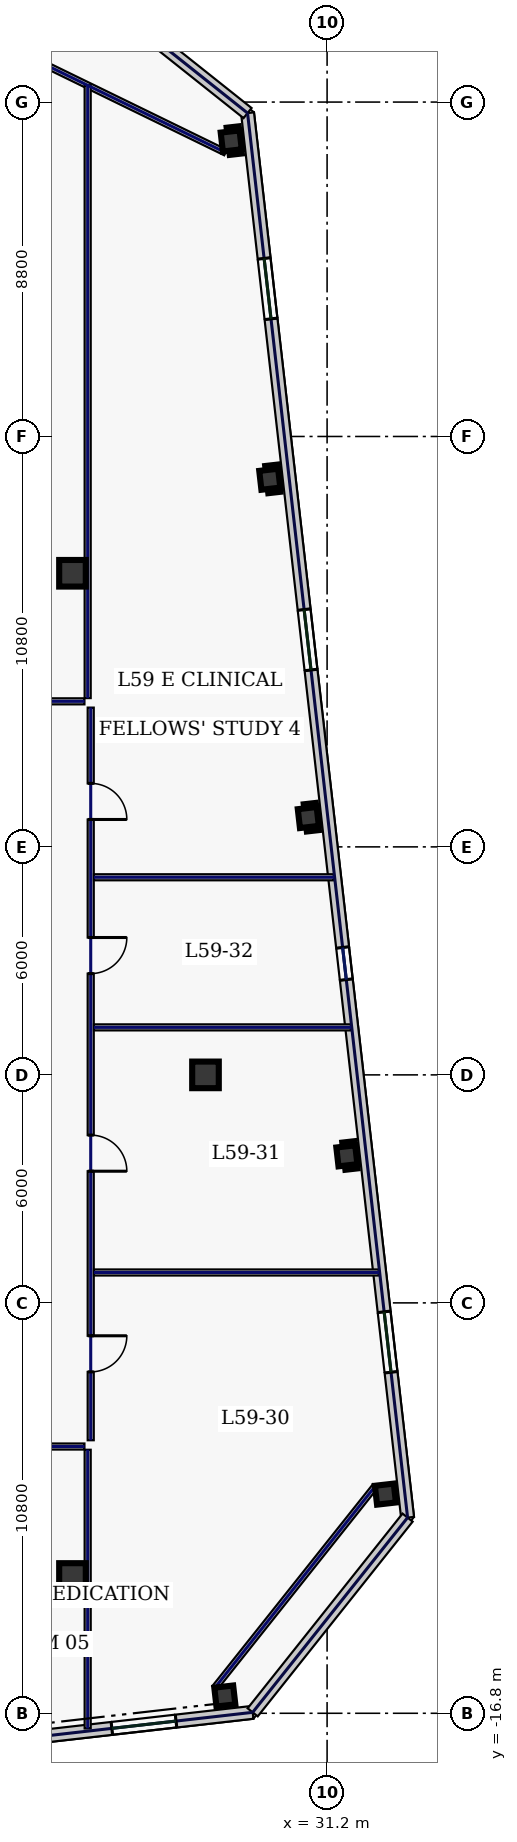
"""IFC4 building model, lengths in metres.
Left out: names, types, materials, properties, quantities, classifications, styles, units other than length and angle.
Written with IfcOpenShell. Run it as: python <this file> out.ifc"""

import sys

from ifc_helpers import new_model, si_unit, direction, frame, frame_2d, origin, origin_2d, place, context, subcontext, project, spatial, rectangle, hollow_rectangle, extrude, element, fill, save


model = new_model("IFC4")
c1 = context("Model", 3, precision=1e-05, world=origin(), true_north=direction((0.0, 1.0)))
c2 = subcontext(c1, "Body", "Model", "MODEL_VIEW")
j1 = project(units=[si_unit("LENGTHUNIT", "METRE"), si_unit("PLANEANGLEUNIT", "RADIAN")], contexts=[c1])
p1 = place(None, origin())
s1 = spatial("IfcSite", under=j1, at=p1, CompositionType="ELEMENT")
p2 = place(p1, origin())
s2 = spatial("IfcBuilding", under=s1, at=p2, CompositionType="ELEMENT")
p3 = place(p2, frame((0.0, 0.0, 255.0)))
s3 = spatial("IfcBuildingStorey", under=s2, at=p3, CompositionType="ELEMENT", Elevation=255.0)
for number, where, z_axis, x_axis in (
    (1, (24.5, -13.2, 0.0), (0.0, 0.0, 1.0), (1.0, 0.0, 0.0)),
    (2, (24.5, 13.2, 0.0), (0.0, 0.0, 1.0), (1.0, 0.0, 0.0)),
    (3, (28.0, 0.0, 0.0), (0.0, 0.0, 1.0), (1.0, 0.0, 0.0)),
):
    element("IfcColumn", number, at=place(p3, frame(where, z_axis=z_axis, x_axis=x_axis)), inside=s3, PredefinedType="COLUMN", context=c2, shape_type="SweptSolid", body=[
        extrude(hollow_rectangle(XDim=0.7, YDim=0.7, WallThickness=0.032, at=origin_2d()), origin(), (0.0, 0.0, 1.0), 3.74),
    ])
for number, where, z_axis, x_axis in (
    (4, (28.509, -16.345, 0.0), (0.0, 0.0, 1.0), (0.994, 0.113, 0.0)),
    (5, (32.734, -11.033, 0.0), (0.0, 0.0, 1.0), (0.994, 0.113, 0.0)),
    (6, (31.72, -2.131, 0.0), (0.0, 0.0, 1.0), (0.994, 0.113, 0.0)),
    (7, (30.706, 6.772, 0.0), (0.0, 0.0, 1.0), (0.994, 0.113, 0.0)),
    (8, (29.691, 15.674, 0.0), (0.0, 0.0, 1.0), (0.994, 0.113, 0.0)),
    (9, (28.677, 24.577, 0.0), (0.0, 0.0, 1.0), (0.994, 0.113, 0.0)),
):
    element("IfcColumn", number, at=place(p3, frame(where, z_axis=z_axis, x_axis=x_axis)), inside=s3, PredefinedType="COLUMN", context=c2, shape_type="SweptSolid", body=[
        extrude(hollow_rectangle(XDim=0.5, YDim=0.5, WallThickness=0.025, at=origin_2d()), origin(), (0.0, 0.0, 1.0), 3.74),
    ])
p4 = place(p3, frame((10.71, -18.886, 0.0), z_axis=(0.0, 0.0, 1.0), x_axis=(0.993572271362, 0.113199565282, 0.0)))
e10 = element("IfcWall", 10, at=p4, inside=s3, PredefinedType="STANDARD", context=c2, shape_type="SweptSolid", body=[
    extrude(rectangle(XDim=18.651, YDim=0.34, at=frame_2d((9.326, 0.0))), origin(), (0.0, 0.0, 1.0), 3.74),
])
p5 = place(p4, frame((3.024, 0.0, 0.88)))
e11 = element("IfcOpeningElement", 11, at=p5, cuts=e10, PredefinedType="OPENING", context=c2, shape_type="SweptSolid", body=[
    extrude(rectangle(XDim=1.7, YDim=1.95, at=frame_2d((0.85, 0.975))), frame((0.0, 0.18, 0.0), z_axis=(0.0, -1.0, 0.0), x_axis=(1.0, 0.0, 0.0)), (0.0, 0.0, 1.0), 0.36),
])
p6 = place(p4, frame((6.773, 0.0, 0.88)))
e12 = element("IfcOpeningElement", 12, at=p6, cuts=e10, PredefinedType="OPENING", context=c2, shape_type="SweptSolid", body=[
    extrude(rectangle(XDim=1.7, YDim=1.95, at=frame_2d((0.85, 0.975))), frame((0.0, 0.18, 0.0), z_axis=(0.0, -1.0, 0.0), x_axis=(1.0, 0.0, 0.0)), (0.0, 0.0, 1.0), 0.36),
])
p7 = place(p4, frame((11.173, 0.0, 0.88)))
e13 = element("IfcOpeningElement", 13, at=p7, cuts=e10, PredefinedType="OPENING", context=c2, shape_type="SweptSolid", body=[
    extrude(rectangle(XDim=1.7, YDim=1.95, at=frame_2d((0.85, 0.975))), frame((0.0, 0.18, 0.0), z_axis=(0.0, -1.0, 0.0), x_axis=(1.0, 0.0, 0.0)), (0.0, 0.0, 1.0), 0.36),
])
p8 = place(p4, frame((14.921, 0.0, 0.88)))
e14 = element("IfcOpeningElement", 14, at=p8, cuts=e10, PredefinedType="OPENING", context=c2, shape_type="SweptSolid", body=[
    extrude(rectangle(XDim=1.7, YDim=1.95, at=frame_2d((0.85, 0.975))), frame((0.0, 0.18, 0.0), z_axis=(0.0, -1.0, 0.0), x_axis=(1.0, 0.0, 0.0)), (0.0, 0.0, 1.0), 0.36),
])
p9 = place(p3, frame((33.318, -11.651, 0.0), z_axis=(0.0, 0.0, 1.0), x_axis=(-0.11320360501, 0.9935718111, 0.0)))
e15 = element("IfcWall", 15, at=p9, inside=s3, PredefinedType="STANDARD", context=c2, shape_type="SweptSolid", body=[
    extrude(rectangle(XDim=37.2, YDim=0.34, at=frame_2d((18.6, 0.0))), origin(), (0.0, 0.0, 1.0), 3.74),
])
p10 = place(p9, frame((3.85, 0.0, 0.58)))
e16 = element("IfcOpeningElement", 16, at=p10, cuts=e15, PredefinedType="OPENING", context=c2, shape_type="SweptSolid", body=[
    extrude(rectangle(XDim=1.6, YDim=2.3, at=frame_2d((0.8, 1.15))), frame((0.0, 0.18, 0.0), z_axis=(0.0, -1.0, 0.0), x_axis=(1.0, 0.0, 0.0)), (0.0, 0.0, 1.0), 0.36),
])
p11 = place(p9, frame((14.25, 0.0, 0.75)))
e17 = element("IfcOpeningElement", 17, at=p11, cuts=e15, PredefinedType="OPENING", context=c2, shape_type="SweptSolid", body=[
    extrude(rectangle(XDim=0.85, YDim=1.85, at=frame_2d((0.425, 0.925))), frame((0.0, 0.18, 0.0), z_axis=(0.0, -1.0, 0.0), x_axis=(1.0, 0.0, 0.0)), (0.0, 0.0, 1.0), 0.36),
])
p12 = place(p9, frame((22.45, 0.0, 0.58)))
e18 = element("IfcOpeningElement", 18, at=p12, cuts=e15, PredefinedType="OPENING", context=c2, shape_type="SweptSolid", body=[
    extrude(rectangle(XDim=1.6, YDim=2.3, at=frame_2d((0.8, 1.15))), frame((0.0, 0.18, 0.0), z_axis=(0.0, -1.0, 0.0), x_axis=(1.0, 0.0, 0.0)), (0.0, 0.0, 1.0), 0.36),
])
p13 = place(p9, frame((31.75, 0.0, 0.58)))
e19 = element("IfcOpeningElement", 19, at=p13, cuts=e15, PredefinedType="OPENING", context=c2, shape_type="SweptSolid", body=[
    extrude(rectangle(XDim=1.6, YDim=2.3, at=frame_2d((0.8, 1.15))), frame((0.0, 0.18, 0.0), z_axis=(0.0, -1.0, 0.0), x_axis=(1.0, 0.0, 0.0)), (0.0, 0.0, 1.0), 0.36),
])
for number, where, z_axis, x_axis in (
    (20, (29.242, -16.775, 0.0), (0.0, 0.0, 1.0), (0.623, 0.783, 0.0)),
    (21, (29.107, 25.31, 0.0), (0.0, 0.0, 1.0), (-0.783, 0.623, 0.0)),
):
    element("IfcWall", number, at=place(p3, frame(where, z_axis=z_axis, x_axis=x_axis)), inside=s3, PredefinedType="STANDARD", context=c2, shape_type="SweptSolid", body=[
        extrude(rectangle(XDim=6.548, YDim=0.34, at=frame_2d((3.274, 0.0))), origin(), (0.0, 0.0, 1.0), 3.74),
    ])
p14 = place(p3, frame((28.242, -16.134, 0.0), z_axis=(0.0, 0.0, 1.0), x_axis=(0.622521563328, 0.782602647064, 0.0)))
e22 = element("IfcWall", 22, at=p14, inside=s3, PredefinedType="PARTITIONING", context=c2, shape_type="SweptSolid", body=[
    extrude(rectangle(XDim=6.788, YDim=0.16, at=frame_2d((3.394, 0.0))), origin(), (0.0, 0.0, 1.0), 3.74),
])
p15 = place(p3, frame((28.528, 24.271, 0.0), z_axis=(0.0, 0.0, 1.0), x_axis=(-0.898820692789, 0.438316509173, 0.0)))
e23 = element("IfcWall", 23, at=p15, inside=s3, PredefinedType="PARTITIONING", context=c2, shape_type="SweptSolid", body=[
    extrude(rectangle(XDim=6.107, YDim=0.16, at=frame_2d((3.053, 0.0))), origin(), (0.0, 0.0, 1.0), 3.74),
])
p16 = place(p3, frame((-24.815, 9.83, 0.0), z_axis=(0.0, 0.0, 1.0), x_axis=(1.0, 0.0, 0.0)))
e24 = element("IfcWall", 24, at=p16, inside=s3, PredefinedType="PARTITIONING", context=c2, shape_type="SweptSolid", body=[
    extrude(rectangle(XDim=49.63, YDim=0.16, at=frame_2d((24.815, 0.0))), origin(), (0.0, 0.0, 1.0), 3.74),
])
p17 = place(p16, frame((1.869, 0.0, 0.0)))
e25 = element("IfcOpeningElement", 25, at=p17, cuts=e24, PredefinedType="OPENING", context=c2, shape_type="SweptSolid", body=[
    extrude(rectangle(XDim=1.3, YDim=2.2, at=frame_2d((0.65, 1.1))), frame((0.0, 0.09, 0.0), z_axis=(0.0, -1.0, 0.0), x_axis=(1.0, 0.0, 0.0)), (0.0, 0.0, 1.0), 0.18),
])
p18 = place(p16, frame((7.613, 0.0, 0.0)))
e26 = element("IfcOpeningElement", 26, at=p18, cuts=e24, PredefinedType="OPENING", context=c2, shape_type="SweptSolid", body=[
    extrude(rectangle(XDim=0.95, YDim=2.2, at=frame_2d((0.475, 1.1))), frame((0.0, 0.09, 0.0), z_axis=(0.0, -1.0, 0.0), x_axis=(1.0, 0.0, 0.0)), (0.0, 0.0, 1.0), 0.18),
])
p19 = place(p16, frame((14.038, 0.0, 0.0)))
e27 = element("IfcOpeningElement", 27, at=p19, cuts=e24, PredefinedType="OPENING", context=c2, shape_type="SweptSolid", body=[
    extrude(rectangle(XDim=0.95, YDim=2.2, at=frame_2d((0.475, 1.1))), frame((0.0, 0.09, 0.0), z_axis=(0.0, -1.0, 0.0), x_axis=(1.0, 0.0, 0.0)), (0.0, 0.0, 1.0), 0.18),
])
p20 = place(p16, frame((21.125, 0.0, 0.0)))
e28 = element("IfcOpeningElement", 28, at=p20, cuts=e24, PredefinedType="OPENING", context=c2, shape_type="SweptSolid", body=[
    extrude(rectangle(XDim=1.3, YDim=2.2, at=frame_2d((0.65, 1.1))), frame((0.0, 0.09, 0.0), z_axis=(0.0, -1.0, 0.0), x_axis=(1.0, 0.0, 0.0)), (0.0, 0.0, 1.0), 0.18),
])
p21 = place(p16, frame((29.225, 0.0, 0.0)))
e29 = element("IfcOpeningElement", 29, at=p21, cuts=e24, PredefinedType="OPENING", context=c2, shape_type="SweptSolid", body=[
    extrude(rectangle(XDim=1.3, YDim=2.2, at=frame_2d((0.65, 1.1))), frame((0.0, 0.09, 0.0), z_axis=(0.0, -1.0, 0.0), x_axis=(1.0, 0.0, 0.0)), (0.0, 0.0, 1.0), 0.18),
])
p22 = place(p16, frame((36.312, 0.0, 0.0)))
e30 = element("IfcOpeningElement", 30, at=p22, cuts=e24, PredefinedType="OPENING", context=c2, shape_type="SweptSolid", body=[
    extrude(rectangle(XDim=0.95, YDim=2.2, at=frame_2d((0.475, 1.1))), frame((0.0, 0.09, 0.0), z_axis=(0.0, -1.0, 0.0), x_axis=(1.0, 0.0, 0.0)), (0.0, 0.0, 1.0), 0.18),
])
p23 = place(p16, frame((41.863, 0.0, 0.0)))
e31 = element("IfcOpeningElement", 31, at=p23, cuts=e24, PredefinedType="OPENING", context=c2, shape_type="SweptSolid", body=[
    extrude(rectangle(XDim=1.3, YDim=2.2, at=frame_2d((0.65, 1.1))), frame((0.0, 0.09, 0.0), z_axis=(0.0, -1.0, 0.0), x_axis=(1.0, 0.0, 0.0)), (0.0, 0.0, 1.0), 0.18),
])
p24 = place(p16, frame((46.806, 0.0, 0.0)))
e32 = element("IfcOpeningElement", 32, at=p24, cuts=e24, PredefinedType="OPENING", context=c2, shape_type="SweptSolid", body=[
    extrude(rectangle(XDim=0.95, YDim=2.2, at=frame_2d((0.475, 1.1))), frame((0.0, 0.09, 0.0), z_axis=(0.0, -1.0, 0.0), x_axis=(1.0, 0.0, 0.0)), (0.0, 0.0, 1.0), 0.18),
])
p25 = place(p3, frame((24.98, 9.665, 0.0), z_axis=(0.0, 0.0, 1.0), x_axis=(0.0, -1.0, 0.0)))
e33 = element("IfcWall", 33, at=p25, inside=s3, PredefinedType="PARTITIONING", context=c2, shape_type="SweptSolid", body=[
    extrude(rectangle(XDim=19.28, YDim=0.16, at=frame_2d((9.64, 0.0))), origin(), (0.0, 0.0, 1.0), 3.74),
])
p26 = place(p25, frame((16.531, 0.0, 0.0)))
e34 = element("IfcOpeningElement", 34, at=p26, cuts=e33, PredefinedType="OPENING", context=c2, shape_type="SweptSolid", body=[
    extrude(rectangle(XDim=0.95, YDim=2.2, at=frame_2d((0.475, 1.1))), frame((0.0, 0.09, 0.0), z_axis=(0.0, -1.0, 0.0), x_axis=(1.0, 0.0, 0.0)), (0.0, 0.0, 1.0), 0.18),
])
p27 = place(p25, frame((11.25, 0.0, 0.0)))
e35 = element("IfcOpeningElement", 35, at=p27, cuts=e33, PredefinedType="OPENING", context=c2, shape_type="SweptSolid", body=[
    extrude(rectangle(XDim=0.95, YDim=2.2, at=frame_2d((0.475, 1.1))), frame((0.0, 0.09, 0.0), z_axis=(0.0, -1.0, 0.0), x_axis=(1.0, 0.0, 0.0)), (0.0, 0.0, 1.0), 0.18),
])
p28 = place(p25, frame((6.05, 0.0, 0.0)))
e36 = element("IfcOpeningElement", 36, at=p28, cuts=e33, PredefinedType="OPENING", context=c2, shape_type="SweptSolid", body=[
    extrude(rectangle(XDim=0.95, YDim=2.2, at=frame_2d((0.475, 1.1))), frame((0.0, 0.09, 0.0), z_axis=(0.0, -1.0, 0.0), x_axis=(1.0, 0.0, 0.0)), (0.0, 0.0, 1.0), 0.18),
])
p29 = place(p25, frame((1.994, 0.0, 0.0)))
e37 = element("IfcOpeningElement", 37, at=p29, cuts=e33, PredefinedType="OPENING", context=c2, shape_type="SweptSolid", body=[
    extrude(rectangle(XDim=0.95, YDim=2.2, at=frame_2d((0.475, 1.1))), frame((0.0, 0.09, 0.0), z_axis=(0.0, -1.0, 0.0), x_axis=(1.0, 0.0, 0.0)), (0.0, 0.0, 1.0), 0.18),
])
p30 = place(p3, frame((24.815, -9.78, 0.0), z_axis=(0.0, 0.0, 1.0), x_axis=(-1.0, 0.0, 0.0)))
e38 = element("IfcWall", 38, at=p30, inside=s3, PredefinedType="PARTITIONING", context=c2, shape_type="SweptSolid", body=[
    extrude(rectangle(XDim=37.35, YDim=0.16, at=frame_2d((18.675, 0.0))), origin(), (0.0, 0.0, 1.0), 3.74),
])
p31 = place(p30, frame((27.55, 0.0, 0.0)))
e39 = element("IfcOpeningElement", 39, at=p31, cuts=e38, PredefinedType="OPENING", context=c2, shape_type="SweptSolid", body=[
    extrude(rectangle(XDim=0.95, YDim=2.2, at=frame_2d((0.475, 1.1))), frame((0.0, 0.09, 0.0), z_axis=(0.0, -1.0, 0.0), x_axis=(1.0, 0.0, 0.0)), (0.0, 0.0, 1.0), 0.18),
])
p32 = place(p30, frame((19.275, 0.0, 0.0)))
e40 = element("IfcOpeningElement", 40, at=p32, cuts=e38, PredefinedType="OPENING", context=c2, shape_type="SweptSolid", body=[
    extrude(rectangle(XDim=1.3, YDim=2.2, at=frame_2d((0.65, 1.1))), frame((0.0, 0.09, 0.0), z_axis=(0.0, -1.0, 0.0), x_axis=(1.0, 0.0, 0.0)), (0.0, 0.0, 1.0), 0.18),
])
p33 = place(p30, frame((9.725, 0.0, 0.0)))
e41 = element("IfcOpeningElement", 41, at=p33, cuts=e38, PredefinedType="OPENING", context=c2, shape_type="SweptSolid", body=[
    extrude(rectangle(XDim=1.3, YDim=2.2, at=frame_2d((0.65, 1.1))), frame((0.0, 0.09, 0.0), z_axis=(0.0, -1.0, 0.0), x_axis=(1.0, 0.0, 0.0)), (0.0, 0.0, 1.0), 0.18),
])
p34 = place(p30, frame((2.044, 0.0, 0.0)))
e42 = element("IfcOpeningElement", 42, at=p34, cuts=e38, PredefinedType="OPENING", context=c2, shape_type="SweptSolid", body=[
    extrude(rectangle(XDim=0.95, YDim=2.2, at=frame_2d((0.475, 1.1))), frame((0.0, 0.09, 0.0), z_axis=(0.0, -1.0, 0.0), x_axis=(1.0, 0.0, 0.0)), (0.0, 0.0, 1.0), 0.18),
])
p35 = place(p3, frame((24.9, 9.915, 0.0), z_axis=(0.0, 0.0, 1.0), x_axis=(0.0, 1.0, 0.0)))
e43 = element("IfcWall", 43, at=p35, inside=s3, PredefinedType="PARTITIONING", context=c2, shape_type="SweptSolid", body=[
    extrude(rectangle(XDim=16.129, YDim=0.16, at=frame_2d((8.065, 0.0))), origin(), (0.0, 0.0, 1.0), 3.74),
])
p36 = place(p3, frame((24.9, -17.199, 0.0), z_axis=(0.0, 0.0, 1.0), x_axis=(0.0, 1.0, 0.0)))
e44 = element("IfcWall", 44, at=p36, inside=s3, PredefinedType="PARTITIONING", context=c2, shape_type="SweptSolid", body=[
    extrude(rectangle(XDim=7.334, YDim=0.16, at=frame_2d((3.667, 0.0))), origin(), (0.0, 0.0, 1.0), 3.74),
])
p37 = place(p3, frame((25.065, -5.2, 0.0), z_axis=(0.0, 0.0, 1.0), x_axis=(1.0, 0.0, 0.0)))
e45 = element("IfcWall", 45, at=p37, inside=s3, PredefinedType="PARTITIONING", context=c2, shape_type="SweptSolid", body=[
    extrude(rectangle(XDim=7.498, YDim=0.16, at=frame_2d((3.749, 0.0))), origin(), (0.0, 0.0, 1.0), 3.74),
])
p38 = place(p3, frame((25.065, 1.25, 0.0), z_axis=(0.0, 0.0, 1.0), x_axis=(1.0, 0.0, 0.0)))
e46 = element("IfcWall", 46, at=p38, inside=s3, PredefinedType="PARTITIONING", context=c2, shape_type="SweptSolid", body=[
    extrude(rectangle(XDim=6.763, YDim=0.16, at=frame_2d((3.382, 0.0))), origin(), (0.0, 0.0, 1.0), 3.74),
])
p39 = place(p3, frame((25.065, 5.2, 0.0), z_axis=(0.0, 0.0, 1.0), x_axis=(1.0, 0.0, 0.0)))
e47 = element("IfcWall", 47, at=p39, inside=s3, PredefinedType="PARTITIONING", context=c2, shape_type="SweptSolid", body=[
    extrude(rectangle(XDim=6.313, YDim=0.16, at=frame_2d((3.157, 0.0))), origin(), (0.0, 0.0, 1.0), 3.74),
])
p40 = place(p8, origin())
e48 = element("IfcWindow", 48, at=p40, inside=s3, PartitioningType="SINGLE_PANEL", PredefinedType="WINDOW", context=c2, shape_type="SweptSolid", body=[
    extrude(rectangle(XDim=1.7, YDim=1.95, at=frame_2d((0.85, 0.975))), frame((0.0, 0.03, 0.0), z_axis=(0.0, -1.0, 0.0), x_axis=(1.0, 0.0, 0.0)), (0.0, 0.0, 1.0), 0.06),
])
fill(e14, e48)
p41 = place(p10, origin())
e49 = element("IfcWindow", 49, at=p41, inside=s3, PartitioningType="SINGLE_PANEL", PredefinedType="WINDOW", context=c2, shape_type="SweptSolid", body=[
    extrude(rectangle(XDim=1.6, YDim=2.3, at=frame_2d((0.8, 1.15))), frame((0.0, 0.03, 0.0), z_axis=(0.0, -1.0, 0.0), x_axis=(1.0, 0.0, 0.0)), (0.0, 0.0, 1.0), 0.06),
])
fill(e16, e49)
p42 = place(p11, origin())
e50 = element("IfcWindow", 50, at=p42, inside=s3, PartitioningType="SINGLE_PANEL", PredefinedType="WINDOW", context=c2, shape_type="SweptSolid", body=[
    extrude(rectangle(XDim=0.85, YDim=1.85, at=frame_2d((0.425, 0.925))), frame((0.0, 0.03, 0.0), z_axis=(0.0, -1.0, 0.0), x_axis=(1.0, 0.0, 0.0)), (0.0, 0.0, 1.0), 0.06),
])
fill(e17, e50)
p43 = place(p12, origin())
e51 = element("IfcWindow", 51, at=p43, inside=s3, PartitioningType="SINGLE_PANEL", PredefinedType="WINDOW", context=c2, shape_type="SweptSolid", body=[
    extrude(rectangle(XDim=1.6, YDim=2.3, at=frame_2d((0.8, 1.15))), frame((0.0, 0.03, 0.0), z_axis=(0.0, -1.0, 0.0), x_axis=(1.0, 0.0, 0.0)), (0.0, 0.0, 1.0), 0.06),
])
fill(e18, e51)
p44 = place(p13, origin())
e52 = element("IfcWindow", 52, at=p44, inside=s3, PartitioningType="SINGLE_PANEL", PredefinedType="WINDOW", context=c2, shape_type="SweptSolid", body=[
    extrude(rectangle(XDim=1.6, YDim=2.3, at=frame_2d((0.8, 1.15))), frame((0.0, 0.03, 0.0), z_axis=(0.0, -1.0, 0.0), x_axis=(1.0, 0.0, 0.0)), (0.0, 0.0, 1.0), 0.06),
])
fill(e19, e52)
p45 = place(p26, origin())
e53 = element("IfcDoor", 53, at=p45, inside=s3, OperationType="SINGLE_SWING_LEFT", PredefinedType="DOOR", context=c2, shape_type="SweptSolid", body=[
    extrude(rectangle(XDim=0.95, YDim=2.2, at=frame_2d((0.475, 1.1))), frame((0.0, 0.025, 0.0), z_axis=(0.0, -1.0, 0.0), x_axis=(1.0, 0.0, 0.0)), (0.0, 0.0, 1.0), 0.05),
])
fill(e34, e53)
p46 = place(p27, origin())
e54 = element("IfcDoor", 54, at=p46, inside=s3, OperationType="SINGLE_SWING_RIGHT", PredefinedType="DOOR", context=c2, shape_type="SweptSolid", body=[
    extrude(rectangle(XDim=0.95, YDim=2.2, at=frame_2d((0.475, 1.1))), frame((0.0, 0.025, 0.0), z_axis=(0.0, -1.0, 0.0), x_axis=(1.0, 0.0, 0.0)), (0.0, 0.0, 1.0), 0.05),
])
fill(e35, e54)
p47 = place(p28, origin())
e55 = element("IfcDoor", 55, at=p47, inside=s3, OperationType="SINGLE_SWING_LEFT", PredefinedType="DOOR", context=c2, shape_type="SweptSolid", body=[
    extrude(rectangle(XDim=0.95, YDim=2.2, at=frame_2d((0.475, 1.1))), frame((0.0, 0.025, 0.0), z_axis=(0.0, -1.0, 0.0), x_axis=(1.0, 0.0, 0.0)), (0.0, 0.0, 1.0), 0.05),
])
fill(e36, e55)
p48 = place(p29, origin())
e56 = element("IfcDoor", 56, at=p48, inside=s3, OperationType="SINGLE_SWING_RIGHT", PredefinedType="DOOR", context=c2, shape_type="SweptSolid", body=[
    extrude(rectangle(XDim=0.95, YDim=2.2, at=frame_2d((0.475, 1.1))), frame((0.0, 0.025, 0.0), z_axis=(0.0, -1.0, 0.0), x_axis=(1.0, 0.0, 0.0)), (0.0, 0.0, 1.0), 0.05),
])
fill(e37, e56)
save(model, sys.argv[1])
